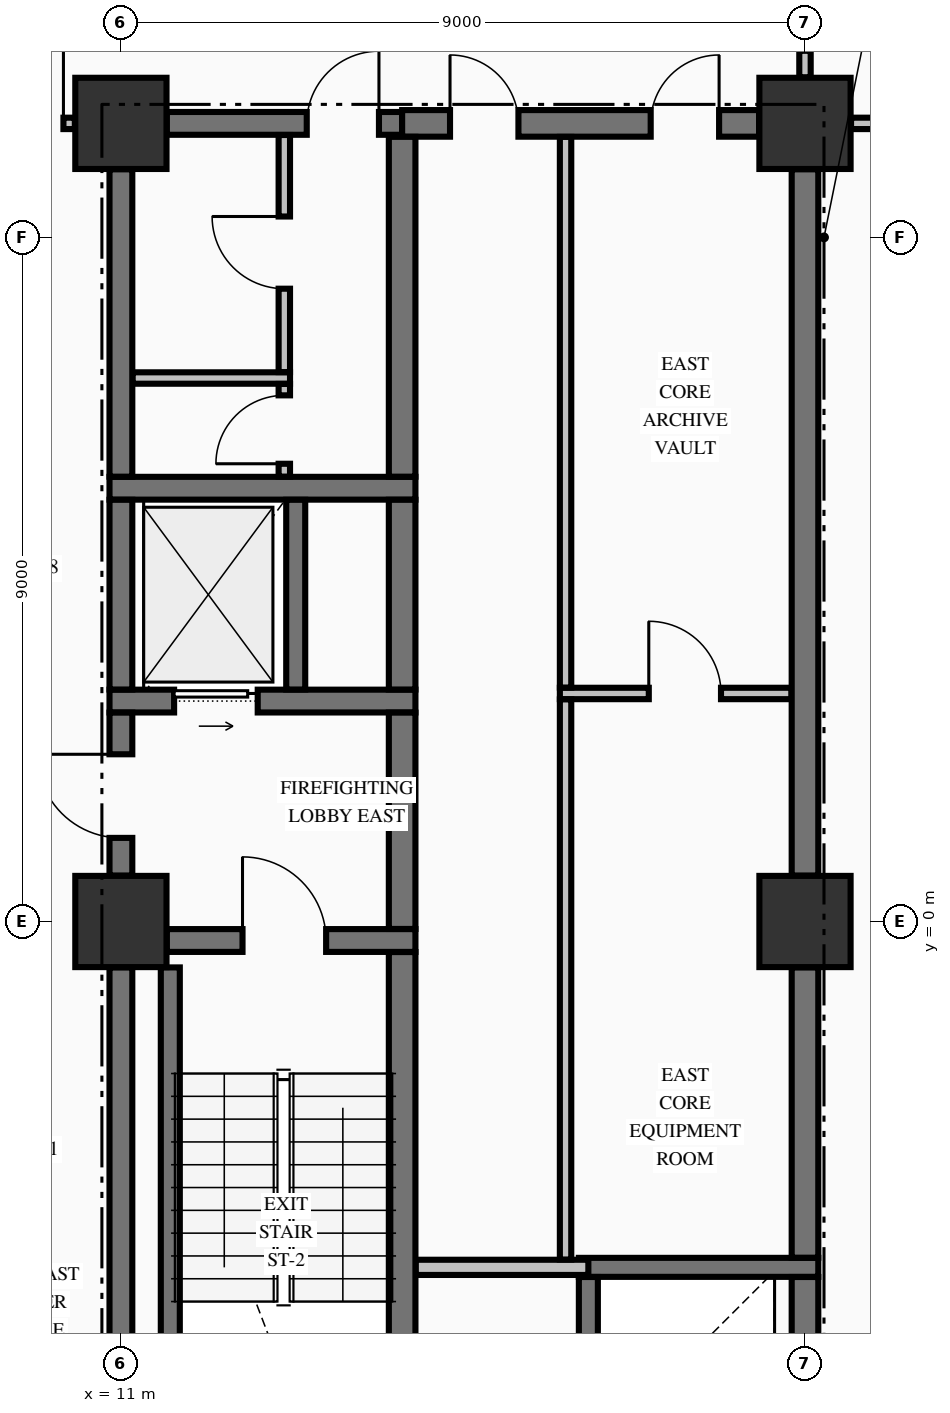
"""IFC4 building model, lengths in metres.
Left out: names, types, materials, properties, quantities, classifications, styles, units other than length and angle.
Written with IfcOpenShell. Run it as: python <this file> out.ifc"""

import sys

from ifc_helpers import new_model, si_unit, direction, frame, frame_2d, origin, origin_2d, place, context, subcontext, project, spatial, rectangle, extrude, element, fill, save


model = new_model("IFC4")
c1 = context("Model", 3, precision=1e-05, world=origin(), true_north=direction((0.0, 1.0)))
c2 = subcontext(c1, "Body", "Model", "MODEL_VIEW")
j1 = project(units=[si_unit("LENGTHUNIT", "METRE"), si_unit("PLANEANGLEUNIT", "RADIAN")], contexts=[c1])
p1 = place(None, origin())
s1 = spatial("IfcSite", under=j1, at=p1, CompositionType="ELEMENT")
p2 = place(p1, origin())
s2 = spatial("IfcBuilding", under=s1, at=p2, CompositionType="ELEMENT")
p3 = place(p2, frame((0.0, 0.0, 57.19)))
s3 = spatial("IfcBuildingStorey", under=s2, at=p3, CompositionType="ELEMENT", Elevation=57.19)
for number, where, z_axis, x_axis in (
    (1, (11.0, 0.0, -0.425), (0.0, 0.0, 1.0), (1.0, 0.0, 0.0)),
    (2, (11.0, 10.5, -0.425), (0.0, 0.0, 1.0), (1.0, 0.0, 0.0)),
    (3, (20.0, 10.5, -0.425), (0.0, 0.0, 1.0), (1.0, 0.0, 0.0)),
    (4, (20.0, 0.0, -0.425), (0.0, 0.0, 1.0), (1.0, 0.0, 0.0)),
):
    element("IfcColumn", number, at=place(p3, frame(where, z_axis=z_axis, x_axis=x_axis)), inside=s3, PredefinedType="COLUMN", context=c2, shape_type="SweptSolid", body=[
        extrude(rectangle(XDim=1.2, YDim=1.2, at=origin_2d()), origin(), (0.0, 0.0, 1.0), 3.695),
    ])
p4 = place(p3, frame((17.025, -4.55, 0.0), z_axis=(0.0, 0.0, 1.0), x_axis=(1.0, 0.0, 0.0)))
e5 = element("IfcWall", 5, at=p4, inside=s3, PredefinedType="SOLIDWALL", context=c2, shape_type="SweptSolid", body=[
    extrude(rectangle(XDim=3.15, YDim=0.25, at=frame_2d((1.575, 0.0))), origin(), (0.0, 0.0, 1.0), 3.27),
])
p5 = place(p3, frame((11.604, -0.25, 0.0), z_axis=(0.0, 0.0, 1.0), x_axis=(1.0, 0.0, 0.0)))
e6 = element("IfcWall", 6, at=p5, inside=s3, PredefinedType="SHEAR", context=c2, shape_type="SweptSolid", body=[
    extrude(rectangle(XDim=3.271, YDim=0.3, at=frame_2d((1.635, 0.0))), origin(), (0.0, 0.0, 1.0), 3.27),
])
p6 = place(p5, frame((0.996, 0.0, 0.0)))
e7 = element("IfcOpeningElement", 7, at=p6, cuts=e6, PredefinedType="OPENING", context=c2, shape_type="SweptSolid", body=[
    extrude(rectangle(XDim=1.1, YDim=2.15, at=frame_2d((0.55, 1.075))), frame((0.0, 0.16, 0.0), z_axis=(0.0, -1.0, 0.0), x_axis=(1.0, 0.0, 0.0)), (0.0, 0.0, 1.0), 0.32),
])
p7 = place(p3, frame((10.85, 2.9, 0.0), z_axis=(0.0, 0.0, 1.0), x_axis=(1.0, 0.0, 0.0)))
e8 = element("IfcWall", 8, at=p7, inside=s3, PredefinedType="SHEAR", context=c2, shape_type="SweptSolid", body=[
    extrude(rectangle(XDim=4.025, YDim=0.3, at=frame_2d((2.012, 0.0))), origin(), (0.0, 0.0, 1.0), 3.27),
])
p8 = place(p7, frame((0.85, 0.0, 0.0)))
e9 = element("IfcOpeningElement", 9, at=p8, cuts=e8, PredefinedType="OPENING", context=c2, shape_type="SweptSolid", body=[
    extrude(rectangle(XDim=1.1, YDim=2.2, at=frame_2d((0.55, 1.1))), frame((0.0, 0.16, 0.0), z_axis=(0.0, -1.0, 0.0), x_axis=(1.0, 0.0, 0.0)), (0.0, 0.0, 1.0), 0.32),
])
p9 = place(p3, frame((10.85, 5.7, 0.0), z_axis=(0.0, 0.0, 1.0), x_axis=(1.0, 0.0, 0.0)))
e10 = element("IfcWall", 10, at=p9, inside=s3, PredefinedType="SHEAR", context=c2, shape_type="SweptSolid", body=[
    extrude(rectangle(XDim=4.025, YDim=0.3, at=frame_2d((2.012, 0.0))), origin(), (0.0, 0.0, 1.0), 3.27),
])
p10 = place(p3, frame((11.604, 10.5, 0.0), z_axis=(0.0, 0.0, 1.0), x_axis=(1.0, 0.0, 0.0)))
e11 = element("IfcWall", 11, at=p10, inside=s3, PredefinedType="SHEAR", context=c2, shape_type="SweptSolid", body=[
    extrude(rectangle(XDim=3.096, YDim=0.3, at=frame_2d((1.548, 0.0))), origin(), (0.0, 0.0, 1.0), 3.27),
])
p11 = place(p10, frame((1.841, 0.0, 0.0)))
e12 = element("IfcOpeningElement", 12, at=p11, cuts=e11, PredefinedType="OPENING", context=c2, shape_type="SweptSolid", body=[
    extrude(rectangle(XDim=0.95, YDim=2.15, at=frame_2d((0.475, 1.075))), frame((0.0, 0.16, 0.0), z_axis=(0.0, -1.0, 0.0), x_axis=(1.0, 0.0, 0.0)), (0.0, 0.0, 1.0), 0.32),
])
p12 = place(p3, frame((14.7, 10.5, 0.0), z_axis=(0.0, 0.0, 1.0), x_axis=(1.0, 0.0, 0.0)))
e13 = element("IfcWall", 13, at=p12, inside=s3, PredefinedType="SHEAR", context=c2, shape_type="SweptSolid", body=[
    extrude(rectangle(XDim=4.696, YDim=0.35, at=frame_2d((2.348, 0.0))), origin(), (0.0, 0.0, 1.0), 3.27),
])
p13 = place(p12, frame((0.63, 0.0, 0.0)))
e14 = element("IfcOpeningElement", 14, at=p13, cuts=e13, PredefinedType="OPENING", context=c2, shape_type="SweptSolid", body=[
    extrude(rectangle(XDim=0.9, YDim=2.15, at=frame_2d((0.45, 1.075))), frame((0.0, 0.185, 0.0), z_axis=(0.0, -1.0, 0.0), x_axis=(1.0, 0.0, 0.0)), (0.0, 0.0, 1.0), 0.37),
])
p14 = place(p12, frame((3.27, 0.0, 0.0)))
e15 = element("IfcOpeningElement", 15, at=p14, cuts=e13, PredefinedType="OPENING", context=c2, shape_type="SweptSolid", body=[
    extrude(rectangle(XDim=0.9, YDim=2.15, at=frame_2d((0.45, 1.075))), frame((0.0, 0.185, 0.0), z_axis=(0.0, -1.0, 0.0), x_axis=(1.0, 0.0, 0.0)), (0.0, 0.0, 1.0), 0.37),
])
p15 = place(p3, frame((14.878, -4.55, 0.0), z_axis=(0.0, 0.0, 1.0), x_axis=(1.0, 0.0, 0.0)))
e16 = element("IfcWall", 16, at=p15, inside=s3, PredefinedType="PARTITIONING", context=c2, shape_type="SweptSolid", body=[
    extrude(rectangle(XDim=2.272, YDim=0.2, at=frame_2d((1.136, 0.0))), origin(), (0.0, 0.0, 1.0), 3.27),
])
p16 = place(p3, frame((16.775, 3.0, 0.0), z_axis=(0.0, 0.0, 1.0), x_axis=(1.0, 0.0, 0.0)))
e17 = element("IfcWall", 17, at=p16, inside=s3, PredefinedType="PARTITIONING", context=c2, shape_type="SweptSolid", body=[
    extrude(rectangle(XDim=3.047, YDim=0.15, at=frame_2d((1.523, 0.0))), origin(), (0.0, 0.0, 1.0), 3.27),
])
p17 = place(p16, frame((1.17, 0.0, 0.0)))
e18 = element("IfcOpeningElement", 18, at=p17, cuts=e17, PredefinedType="OPENING", context=c2, shape_type="SweptSolid", body=[
    extrude(rectangle(XDim=0.95, YDim=2.15, at=frame_2d((0.475, 1.075))), frame((0.0, 0.085, 0.0), z_axis=(0.0, -1.0, 0.0), x_axis=(1.0, 0.0, 0.0)), (0.0, 0.0, 1.0), 0.17),
])
p18 = place(p3, frame((11.153, 7.15, 0.0), z_axis=(0.0, 0.0, 1.0), x_axis=(1.0, 0.0, 0.0)))
e19 = element("IfcWall", 19, at=p18, inside=s3, PredefinedType="PARTITIONING", context=c2, shape_type="SweptSolid", body=[
    extrude(rectangle(XDim=2.072, YDim=0.15, at=frame_2d((1.036, 0.0))), origin(), (0.0, 0.0, 1.0), 3.27),
])
p19 = place(p3, frame((-10.394, 10.5, 0.0), z_axis=(0.0, 0.0, 1.0), x_axis=(1.0, 0.0, 0.0)))
e20 = element("IfcWall", 20, at=p19, inside=s3, PredefinedType="PARTITIONING", context=c2, shape_type="SweptSolid", body=[
    extrude(rectangle(XDim=20.788, YDim=0.15, at=frame_2d((10.394, 0.0))), origin(), (0.0, 0.0, 1.0), 3.27),
])
p20 = place(p19, frame((0.15, 0.0, 0.0)))
e21 = element("IfcOpeningElement", 21, at=p20, cuts=e20, PredefinedType="OPENING", context=c2, shape_type="SweptSolid", body=[
    extrude(rectangle(XDim=1.05, YDim=2.15, at=frame_2d((0.525, 1.075))), frame((0.0, 0.085, 0.0), z_axis=(0.0, -1.0, 0.0), x_axis=(1.0, 0.0, 0.0)), (0.0, 0.0, 1.0), 0.17),
])
p21 = place(p19, frame((19.588, 0.0, 0.0)))
e22 = element("IfcOpeningElement", 22, at=p21, cuts=e20, PredefinedType="OPENING", context=c2, shape_type="SweptSolid", body=[
    extrude(rectangle(XDim=1.05, YDim=2.15, at=frame_2d((0.525, 1.075))), frame((0.0, 0.085, 0.0), z_axis=(0.0, -1.0, 0.0), x_axis=(1.0, 0.0, 0.0)), (0.0, 0.0, 1.0), 0.17),
])
p22 = place(p3, frame((20.606, 10.5, 0.0), z_axis=(0.0, 0.0, 1.0), x_axis=(1.0, 0.0, 0.0)))
e23 = element("IfcWall", 23, at=p22, inside=s3, PredefinedType="PARTITIONING", context=c2, shape_type="SweptSolid", body=[
    extrude(rectangle(XDim=3.229, YDim=0.15, at=frame_2d((1.615, 0.0))), origin(), (0.0, 0.0, 1.0), 3.27),
])
p23 = place(p22, frame((0.894, 0.0, 0.0)))
e24 = element("IfcOpeningElement", 24, at=p23, cuts=e23, PredefinedType="OPENING", context=c2, shape_type="SweptSolid", body=[
    extrude(rectangle(XDim=1.0, YDim=2.15, at=frame_2d((0.5, 1.075))), frame((0.0, 0.085, 0.0), z_axis=(0.0, -1.0, 0.0), x_axis=(1.0, 0.0, 0.0)), (0.0, 0.0, 1.0), 0.17),
])
p24 = place(p3, frame((11.0, -9.346, 0.0), z_axis=(0.0, 0.0, 1.0), x_axis=(0.0, 1.0, 0.0)))
e25 = element("IfcWall", 25, at=p24, inside=s3, PredefinedType="SHEAR", context=c2, shape_type="SweptSolid", body=[
    extrude(rectangle(XDim=8.742, YDim=0.3, at=frame_2d((4.371, 0.0))), origin(), (0.0, 0.0, 1.0), 3.27),
])
p25 = place(p3, frame((11.0, 0.604, 0.0), z_axis=(0.0, 0.0, 1.0), x_axis=(0.0, 1.0, 0.0)))
e26 = element("IfcWall", 26, at=p25, inside=s3, PredefinedType="SHEAR", context=c2, shape_type="SweptSolid", body=[
    extrude(rectangle(XDim=2.144, YDim=0.3, at=frame_2d((1.072, 0.0))), origin(), (0.0, 0.0, 1.0), 3.27),
])
p26 = place(p25, frame((0.496, 0.0, 0.0)))
e27 = element("IfcOpeningElement", 27, at=p26, cuts=e26, PredefinedType="OPENING", context=c2, shape_type="SweptSolid", body=[
    extrude(rectangle(XDim=1.1, YDim=2.15, at=frame_2d((0.55, 1.075))), frame((0.0, 0.16, 0.0), z_axis=(0.0, -1.0, 0.0), x_axis=(1.0, 0.0, 0.0)), (0.0, 0.0, 1.0), 0.32),
])
p27 = place(p3, frame((11.0, 3.052, 0.0), z_axis=(0.0, 0.0, 1.0), x_axis=(0.0, 1.0, 0.0)))
e28 = element("IfcWall", 28, at=p27, inside=s3, PredefinedType="SHEAR", context=c2, shape_type="SweptSolid", body=[
    extrude(rectangle(XDim=2.496, YDim=0.3, at=frame_2d((1.248, 0.0))), origin(), (0.0, 0.0, 1.0), 3.27),
])
p28 = place(p3, frame((11.0, 5.852, 0.0), z_axis=(0.0, 0.0, 1.0), x_axis=(0.0, 1.0, 0.0)))
e29 = element("IfcWall", 29, at=p28, inside=s3, PredefinedType="SHEAR", context=c2, shape_type="SweptSolid", body=[
    extrude(rectangle(XDim=4.044, YDim=0.3, at=frame_2d((2.022, 0.0))), origin(), (0.0, 0.0, 1.0), 3.27),
])
p29 = place(p3, frame((11.65, -9.346, 0.0), z_axis=(0.0, 0.0, 1.0), x_axis=(0.0, 1.0, 0.0)))
e30 = element("IfcWall", 30, at=p29, inside=s3, PredefinedType="SOLIDWALL", context=c2, shape_type="SweptSolid", body=[
    extrude(rectangle(XDim=8.742, YDim=0.25, at=frame_2d((4.371, 0.0))), origin(), (0.0, 0.0, 1.0), 3.27),
])
p30 = place(p3, frame((13.3, 3.052, 0.0), z_axis=(0.0, 0.0, 1.0), x_axis=(0.0, 1.0, 0.0)))
e31 = element("IfcWall", 31, at=p30, inside=s3, PredefinedType="SOLIDWALL", context=c2, shape_type="SweptSolid", body=[
    extrude(rectangle(XDim=2.496, YDim=0.25, at=frame_2d((1.248, 0.0))), origin(), (0.0, 0.0, 1.0), 3.27),
])
p31 = place(p3, frame((14.7, -9.773, 0.0), z_axis=(0.0, 0.0, 1.0), x_axis=(0.0, 1.0, 0.0)))
e32 = element("IfcWall", 32, at=p31, inside=s3, PredefinedType="SHEAR", context=c2, shape_type="SweptSolid", body=[
    extrude(rectangle(XDim=9.371, YDim=0.35, at=frame_2d((4.686, 0.0))), origin(), (0.0, 0.0, 1.0), 3.27),
])
p32 = place(p3, frame((14.7, -0.098, 0.0), z_axis=(0.0, 0.0, 1.0), x_axis=(0.0, 1.0, 0.0)))
e33 = element("IfcWall", 33, at=p32, inside=s3, PredefinedType="SHEAR", context=c2, shape_type="SweptSolid", body=[
    extrude(rectangle(XDim=2.846, YDim=0.35, at=frame_2d((1.423, 0.0))), origin(), (0.0, 0.0, 1.0), 3.27),
])
p33 = place(p3, frame((14.7, 3.052, 0.0), z_axis=(0.0, 0.0, 1.0), x_axis=(0.0, 1.0, 0.0)))
e34 = element("IfcWall", 34, at=p33, inside=s3, PredefinedType="SHEAR", context=c2, shape_type="SweptSolid", body=[
    extrude(rectangle(XDim=2.496, YDim=0.35, at=frame_2d((1.248, 0.0))), origin(), (0.0, 0.0, 1.0), 3.27),
])
p34 = place(p3, frame((14.7, 5.852, 0.0), z_axis=(0.0, 0.0, 1.0), x_axis=(0.0, 1.0, 0.0)))
e35 = element("IfcWall", 35, at=p34, inside=s3, PredefinedType="SHEAR", context=c2, shape_type="SweptSolid", body=[
    extrude(rectangle(XDim=4.471, YDim=0.35, at=frame_2d((2.235, 0.0))), origin(), (0.0, 0.0, 1.0), 3.27),
])
p35 = place(p3, frame((17.15, -6.923, 0.0), z_axis=(0.0, 0.0, 1.0), x_axis=(0.0, 1.0, 0.0)))
e36 = element("IfcWall", 36, at=p35, inside=s3, PredefinedType="SOLIDWALL", context=c2, shape_type="SweptSolid", body=[
    extrude(rectangle(XDim=2.246, YDim=0.25, at=frame_2d((1.123, 0.0))), origin(), (0.0, 0.0, 1.0), 3.27),
])
p36 = place(p3, frame((20.0, -6.923, 0.0), z_axis=(0.0, 0.0, 1.0), x_axis=(0.0, 1.0, 0.0)))
e37 = element("IfcWall", 37, at=p36, inside=s3, PredefinedType="SHEAR", context=c2, shape_type="SweptSolid", body=[
    extrude(rectangle(XDim=2.246, YDim=0.35, at=frame_2d((1.123, 0.0))), origin(), (0.0, 0.0, 1.0), 3.27),
])
p37 = place(p3, frame((20.0, -4.423, 0.0), z_axis=(0.0, 0.0, 1.0), x_axis=(0.0, 1.0, 0.0)))
e38 = element("IfcWall", 38, at=p37, inside=s3, PredefinedType="SHEAR", context=c2, shape_type="SweptSolid", body=[
    extrude(rectangle(XDim=3.819, YDim=0.35, at=frame_2d((1.91, 0.0))), origin(), (0.0, 0.0, 1.0), 3.27),
])
p38 = place(p3, frame((20.0, 0.604, 0.0), z_axis=(0.0, 0.0, 1.0), x_axis=(0.0, 1.0, 0.0)))
e39 = element("IfcWall", 39, at=p38, inside=s3, PredefinedType="SHEAR", context=c2, shape_type="SweptSolid", body=[
    extrude(rectangle(XDim=9.292, YDim=0.35, at=frame_2d((4.646, 0.0))), origin(), (0.0, 0.0, 1.0), 3.27),
])
p39 = place(p3, frame((13.15, 5.853, 0.0), z_axis=(0.0, 0.0, 1.0), x_axis=(0.0, 1.0, 0.0)))
e40 = element("IfcWall", 40, at=p39, inside=s3, PredefinedType="PARTITIONING", context=c2, shape_type="SweptSolid", body=[
    extrude(rectangle(XDim=1.219, YDim=0.15, at=frame_2d((0.609, 0.0))), origin(), (0.0, 0.0, 1.0), 3.27),
])
p40 = place(p39, frame((0.169, 0.0, 0.0)))
e41 = element("IfcOpeningElement", 41, at=p40, cuts=e40, PredefinedType="OPENING", context=c2, shape_type="SweptSolid", body=[
    extrude(rectangle(XDim=0.9, YDim=2.15, at=frame_2d((0.45, 1.075))), frame((0.0, 0.085, 0.0), z_axis=(0.0, -1.0, 0.0), x_axis=(1.0, 0.0, 0.0)), (0.0, 0.0, 1.0), 0.17),
])
p41 = place(p3, frame((13.15, 7.228, 0.0), z_axis=(0.0, 0.0, 1.0), x_axis=(0.0, 1.0, 0.0)))
e42 = element("IfcWall", 42, at=p41, inside=s3, PredefinedType="PARTITIONING", context=c2, shape_type="SweptSolid", body=[
    extrude(rectangle(XDim=3.119, YDim=0.15, at=frame_2d((1.56, 0.0))), origin(), (0.0, 0.0, 1.0), 3.27),
])
p42 = place(p41, frame((1.097, 0.0, 0.0)))
e43 = element("IfcOpeningElement", 43, at=p42, cuts=e42, PredefinedType="OPENING", context=c2, shape_type="SweptSolid", body=[
    extrude(rectangle(XDim=0.95, YDim=2.15, at=frame_2d((0.475, 1.075))), frame((0.0, 0.085, 0.0), z_axis=(0.0, -1.0, 0.0), x_axis=(1.0, 0.0, 0.0)), (0.0, 0.0, 1.0), 0.17),
])
p43 = place(p3, frame((16.85, -4.447, 0.0), z_axis=(0.0, 0.0, 1.0), x_axis=(0.0, 1.0, 0.0)))
e44 = element("IfcWall", 44, at=p43, inside=s3, PredefinedType="PARTITIONING", context=c2, shape_type="SweptSolid", body=[
    extrude(rectangle(XDim=7.369, YDim=0.15, at=frame_2d((3.685, 0.0))), origin(), (0.0, 0.0, 1.0), 3.27),
])
p44 = place(p3, frame((16.85, 3.078, 0.0), z_axis=(0.0, 0.0, 1.0), x_axis=(0.0, 1.0, 0.0)))
e45 = element("IfcWall", 45, at=p44, inside=s3, PredefinedType="PARTITIONING", context=c2, shape_type="SweptSolid", body=[
    extrude(rectangle(XDim=7.244, YDim=0.15, at=frame_2d((3.622, 0.0))), origin(), (0.0, 0.0, 1.0), 3.27),
])
p45 = place(p3, frame((20.0, 11.106, 0.0), z_axis=(0.0, 0.0, 1.0), x_axis=(0.0, 1.0, 0.0)))
e46 = element("IfcWall", 46, at=p45, inside=s3, PredefinedType="PARTITIONING", context=c2, shape_type="SweptSolid", body=[
    extrude(rectangle(XDim=2.166, YDim=0.15, at=frame_2d((1.083, 0.0))), origin(), (0.0, 0.0, 1.0), 3.27),
])
p46 = place(p45, frame((0.349, 0.0, 0.0)))
e47 = element("IfcOpeningElement", 47, at=p46, cuts=e46, PredefinedType="OPENING", context=c2, shape_type="SweptSolid", body=[
    extrude(rectangle(XDim=0.95, YDim=2.15, at=frame_2d((0.475, 1.075))), frame((0.0, 0.085, 0.0), z_axis=(0.0, -1.0, 0.0), x_axis=(1.0, 0.0, 0.0)), (0.0, 0.0, 1.0), 0.17),
])
p47 = place(p6, origin())
e48 = element("IfcDoor", 48, at=p47, inside=s3, OperationType="SINGLE_SWING_LEFT", PredefinedType="DOOR", context=c2, shape_type="SweptSolid", body=[
    extrude(rectangle(XDim=1.1, YDim=2.15, at=frame_2d((0.55, 1.075))), frame((0.0, 0.025, 0.0), z_axis=(0.0, -1.0, 0.0), x_axis=(1.0, 0.0, 0.0)), (0.0, 0.0, 1.0), 0.05),
])
fill(e7, e48)
p48 = place(p26, origin())
e49 = element("IfcDoor", 49, at=p48, inside=s3, OperationType="SINGLE_SWING_RIGHT", PredefinedType="DOOR", context=c2, shape_type="SweptSolid", body=[
    extrude(rectangle(XDim=1.1, YDim=2.15, at=frame_2d((0.55, 1.075))), frame((0.0, 0.025, 0.0), z_axis=(0.0, -1.0, 0.0), x_axis=(1.0, 0.0, 0.0)), (0.0, 0.0, 1.0), 0.05),
])
fill(e27, e49)
p49 = place(p8, origin())
e50 = element("IfcDoor", 50, at=p49, inside=s3, OperationType="SLIDING_TO_RIGHT", PredefinedType="DOOR", context=c2, shape_type="SweptSolid", body=[
    extrude(rectangle(XDim=1.1, YDim=2.2, at=frame_2d((0.55, 1.1))), frame((0.0, 0.025, 0.0), z_axis=(0.0, -1.0, 0.0), x_axis=(1.0, 0.0, 0.0)), (0.0, 0.0, 1.0), 0.05),
])
fill(e9, e50)
p50 = place(p11, origin())
e51 = element("IfcDoor", 51, at=p50, inside=s3, OperationType="SINGLE_SWING_RIGHT", PredefinedType="DOOR", context=c2, shape_type="SweptSolid", body=[
    extrude(rectangle(XDim=0.95, YDim=2.15, at=frame_2d((0.475, 1.075))), frame((0.0, 0.025, 0.0), z_axis=(0.0, -1.0, 0.0), x_axis=(1.0, 0.0, 0.0)), (0.0, 0.0, 1.0), 0.05),
])
fill(e12, e51)
p51 = place(p40, origin())
e52 = element("IfcDoor", 52, at=p51, inside=s3, OperationType="SINGLE_SWING_LEFT", PredefinedType="DOOR", context=c2, shape_type="SweptSolid", body=[
    extrude(rectangle(XDim=0.9, YDim=2.15, at=frame_2d((0.45, 1.075))), frame((0.0, 0.025, 0.0), z_axis=(0.0, -1.0, 0.0), x_axis=(1.0, 0.0, 0.0)), (0.0, 0.0, 1.0), 0.05),
])
fill(e41, e52)
p52 = place(p42, origin())
e53 = element("IfcDoor", 53, at=p52, inside=s3, OperationType="SINGLE_SWING_RIGHT", PredefinedType="DOOR", context=c2, shape_type="SweptSolid", body=[
    extrude(rectangle(XDim=0.95, YDim=2.15, at=frame_2d((0.475, 1.075))), frame((0.0, 0.025, 0.0), z_axis=(0.0, -1.0, 0.0), x_axis=(1.0, 0.0, 0.0)), (0.0, 0.0, 1.0), 0.05),
])
fill(e43, e53)
p53 = place(p13, origin())
e54 = element("IfcDoor", 54, at=p53, inside=s3, OperationType="SINGLE_SWING_LEFT", PredefinedType="DOOR", context=c2, shape_type="SweptSolid", body=[
    extrude(rectangle(XDim=0.9, YDim=2.15, at=frame_2d((0.45, 1.075))), frame((0.0, 0.025, 0.0), z_axis=(0.0, -1.0, 0.0), x_axis=(1.0, 0.0, 0.0)), (0.0, 0.0, 1.0), 0.05),
])
fill(e14, e54)
p54 = place(p14, origin())
e55 = element("IfcDoor", 55, at=p54, inside=s3, OperationType="SINGLE_SWING_RIGHT", PredefinedType="DOOR", context=c2, shape_type="SweptSolid", body=[
    extrude(rectangle(XDim=0.9, YDim=2.15, at=frame_2d((0.45, 1.075))), frame((0.0, 0.025, 0.0), z_axis=(0.0, -1.0, 0.0), x_axis=(1.0, 0.0, 0.0)), (0.0, 0.0, 1.0), 0.05),
])
fill(e15, e55)
p55 = place(p17, origin())
e56 = element("IfcDoor", 56, at=p55, inside=s3, OperationType="SINGLE_SWING_LEFT", PredefinedType="DOOR", context=c2, shape_type="SweptSolid", body=[
    extrude(rectangle(XDim=0.95, YDim=2.15, at=frame_2d((0.475, 1.075))), frame((0.0, 0.025, 0.0), z_axis=(0.0, -1.0, 0.0), x_axis=(1.0, 0.0, 0.0)), (0.0, 0.0, 1.0), 0.05),
])
fill(e18, e56)
p56 = place(p21, origin())
e57 = element("IfcDoor", 57, at=p56, inside=s3, OperationType="SINGLE_SWING_RIGHT", PredefinedType="DOOR", context=c2, shape_type="SweptSolid", body=[
    extrude(rectangle(XDim=1.05, YDim=2.15, at=frame_2d((0.525, 1.075))), frame((0.0, 0.025, 0.0), z_axis=(0.0, -1.0, 0.0), x_axis=(1.0, 0.0, 0.0)), (0.0, 0.0, 1.0), 0.05),
])
fill(e22, e57)
save(model, sys.argv[1])
